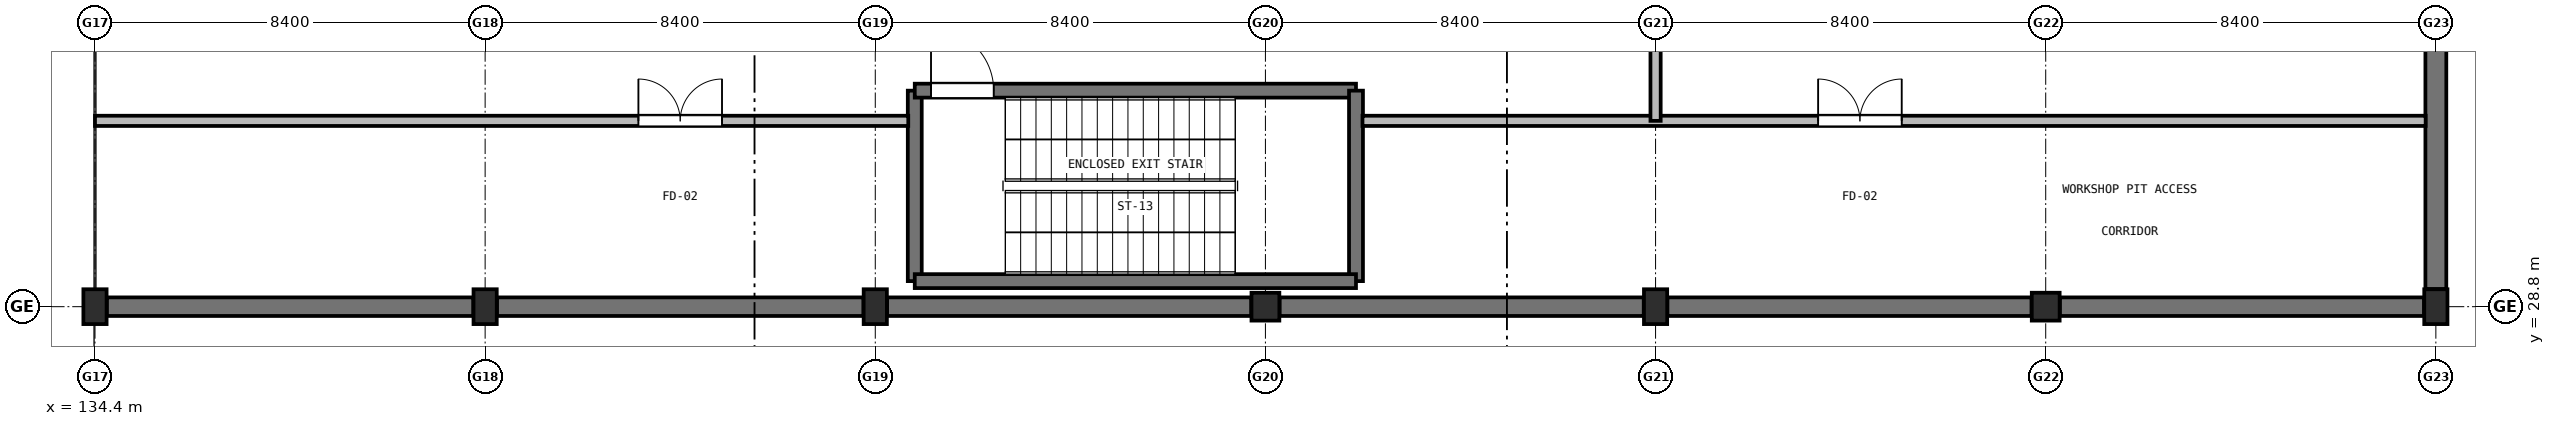
"""IFC4 building model, lengths in metres.
Left out: names, types, materials, properties, quantities, classifications, styles, units other than length and angle.
Written with IfcOpenShell. Run it as: python <this file> out.ifc"""

import sys

from ifc_helpers import new_model, si_unit, direction, frame, frame_2d, origin, origin_2d, place, context, subcontext, project, spatial, rectangle, extrude, element, fill, save


model = new_model("IFC4")
c1 = context("Model", 3, precision=1e-05, world=origin(), true_north=direction((0.0, 1.0)))
c2 = subcontext(c1, "Body", "Model", "MODEL_VIEW")
j1 = project(units=[si_unit("LENGTHUNIT", "METRE"), si_unit("PLANEANGLEUNIT", "RADIAN")], contexts=[c1])
p1 = place(None, origin())
s1 = spatial("IfcSite", under=j1, at=p1, CompositionType="ELEMENT")
p2 = place(p1, origin())
s2 = spatial("IfcBuilding", under=s1, at=p2, CompositionType="ELEMENT")
p3 = place(p2, frame((0.0, 0.0, -4.8)))
s3 = spatial("IfcBuildingStorey", under=s2, at=p3, CompositionType="ELEMENT", Elevation=-4.8)
for number, where, z_axis, x_axis in (
    (1, (134.4, 28.8, 0.0), (0.0, 0.0, 1.0), (1.0, 0.0, 0.0)),
    (2, (142.8, 28.8, 0.0), (0.0, 0.0, 1.0), (1.0, 0.0, 0.0)),
    (3, (151.2, 28.8, 0.0), (0.0, 0.0, 1.0), (1.0, 0.0, 0.0)),
):
    element("IfcColumn", number, at=place(p3, frame(where, z_axis=z_axis, x_axis=x_axis)), inside=s3, PredefinedType="COLUMN", context=c2, shape_type="SweptSolid", body=[
        extrude(rectangle(XDim=0.5, YDim=0.75, at=origin_2d()), origin(), (0.0, 0.0, 1.0), 4.8),
    ])
p4 = place(p3, frame((159.6, 28.8, 0.0), z_axis=(0.0, 0.0, 1.0), x_axis=(1.0, 0.0, 0.0)))
e4 = element("IfcColumn", 4, at=p4, inside=s3, PredefinedType="COLUMN", context=c2, shape_type="SweptSolid", body=[
    extrude(rectangle(XDim=0.6, YDim=0.6, at=origin_2d()), origin(), (0.0, 0.0, 1.0), 4.8),
])
p5 = place(p3, frame((168.0, 28.8, 0.0), z_axis=(0.0, 0.0, 1.0), x_axis=(1.0, 0.0, 0.0)))
e5 = element("IfcColumn", 5, at=p5, inside=s3, PredefinedType="COLUMN", context=c2, shape_type="SweptSolid", body=[
    extrude(rectangle(XDim=0.5, YDim=0.75, at=origin_2d()), origin(), (0.0, 0.0, 1.0), 4.8),
])
p6 = place(p3, frame((176.4, 28.8, 0.0), z_axis=(0.0, 0.0, 1.0), x_axis=(1.0, 0.0, 0.0)))
e6 = element("IfcColumn", 6, at=p6, inside=s3, PredefinedType="COLUMN", context=c2, shape_type="SweptSolid", body=[
    extrude(rectangle(XDim=0.6, YDim=0.6, at=origin_2d()), origin(), (0.0, 0.0, 1.0), 4.8),
])
p7 = place(p3, frame((184.8, 28.8, 0.0), z_axis=(0.0, 0.0, 1.0), x_axis=(1.0, 0.0, 0.0)))
e7 = element("IfcColumn", 7, at=p7, inside=s3, PredefinedType="COLUMN", context=c2, shape_type="SweptSolid", body=[
    extrude(rectangle(XDim=0.5, YDim=0.75, at=origin_2d()), origin(), (0.0, 0.0, 1.0), 4.8),
])
p8 = place(p3, frame((184.8, 29.18, 0.0), z_axis=(0.0, 0.0, 1.0), x_axis=(0.0, 1.0, 0.0)))
e8 = element("IfcWall", 8, at=p8, inside=s3, PredefinedType="SHEAR", context=c2, shape_type="SweptSolid", body=[
    extrude(rectangle(XDim=6.265, YDim=0.45, at=frame_2d((3.133, 0.0))), origin(), (0.0, 0.0, 1.0), 3.64),
])
p9 = place(p3, frame((134.655, 28.8, 0.0), z_axis=(0.0, 0.0, 1.0), x_axis=(1.0, 0.0, 0.0)))
e9 = element("IfcWall", 9, at=p9, inside=s3, PredefinedType="SHEAR", context=c2, shape_type="SweptSolid", body=[
    extrude(rectangle(XDim=7.89, YDim=0.4, at=frame_2d((3.945, 0.0))), origin(), (0.0, 0.0, 1.0), 3.64),
])
p10 = place(p3, frame((143.055, 28.8, 0.0), z_axis=(0.0, 0.0, 1.0), x_axis=(1.0, 0.0, 0.0)))
e10 = element("IfcWall", 10, at=p10, inside=s3, PredefinedType="SHEAR", context=c2, shape_type="SweptSolid", body=[
    extrude(rectangle(XDim=7.89, YDim=0.4, at=frame_2d((3.945, 0.0))), origin(), (0.0, 0.0, 1.0), 3.64),
])
p11 = place(p3, frame((151.455, 28.8, 0.0), z_axis=(0.0, 0.0, 1.0), x_axis=(1.0, 0.0, 0.0)))
e11 = element("IfcWall", 11, at=p11, inside=s3, PredefinedType="SHEAR", context=c2, shape_type="SweptSolid", body=[
    extrude(rectangle(XDim=7.84, YDim=0.4, at=frame_2d((3.92, 0.0))), origin(), (0.0, 0.0, 1.0), 3.64),
])
for number, where, z_axis, x_axis in (
    (12, (159.905, 28.8, 0.0), (0.0, 0.0, 1.0), (1.0, 0.0, 0.0)),
    (13, (168.255, 28.8, 0.0), (0.0, 0.0, 1.0), (1.0, 0.0, 0.0)),
):
    element("IfcWall", number, at=place(p3, frame(where, z_axis=z_axis, x_axis=x_axis)), inside=s3, PredefinedType="SHEAR", context=c2, shape_type="SweptSolid", body=[
        extrude(rectangle(XDim=7.84, YDim=0.4, at=frame_2d((3.92, 0.0))), origin(), (0.0, 0.0, 1.0), 3.64),
    ])
p12 = place(p3, frame((176.705, 28.8, 0.0), z_axis=(0.0, 0.0, 1.0), x_axis=(1.0, 0.0, 0.0)))
e14 = element("IfcWall", 14, at=p12, inside=s3, PredefinedType="SHEAR", context=c2, shape_type="SweptSolid", body=[
    extrude(rectangle(XDim=7.84, YDim=0.4, at=frame_2d((3.92, 0.0))), origin(), (0.0, 0.0, 1.0), 3.64),
])
p13 = place(p3, frame((152.05, 29.35, 0.0), z_axis=(0.0, 0.0, 1.0), x_axis=(0.0, 1.0, 0.0)))
e15 = element("IfcWall", 15, at=p13, inside=s3, PredefinedType="SHEAR", context=c2, shape_type="SweptSolid", body=[
    extrude(rectangle(XDim=4.1, YDim=0.3, at=frame_2d((2.05, 0.0))), origin(), (0.0, 0.0, 1.0), 4.46),
])
p14 = place(p3, frame((152.05, 33.45, 0.0), z_axis=(0.0, 0.0, 1.0), x_axis=(1.0, 0.0, 0.0)))
e16 = element("IfcWall", 16, at=p14, inside=s3, PredefinedType="SHEAR", context=c2, shape_type="SweptSolid", body=[
    extrude(rectangle(XDim=9.5, YDim=0.3, at=frame_2d((4.75, 0.0))), origin(), (0.0, 0.0, 1.0), 4.46),
])
p15 = place(p14, frame((0.35, 0.0, 0.0)))
e17 = element("IfcOpeningElement", 17, at=p15, cuts=e16, PredefinedType="OPENING", context=c2, shape_type="SweptSolid", body=[
    extrude(rectangle(XDim=1.35, YDim=2.2, at=frame_2d((0.675, 1.1))), frame((0.0, 0.16, 0.0), z_axis=(0.0, -1.0, 0.0), x_axis=(1.0, 0.0, 0.0)), (0.0, 0.0, 1.0), 0.32),
])
p16 = place(p3, frame((161.55, 33.45, 0.0), z_axis=(0.0, 0.0, 1.0), x_axis=(0.0, -1.0, 0.0)))
e18 = element("IfcWall", 18, at=p16, inside=s3, PredefinedType="SHEAR", context=c2, shape_type="SweptSolid", body=[
    extrude(rectangle(XDim=4.1, YDim=0.3, at=frame_2d((2.05, 0.0))), origin(), (0.0, 0.0, 1.0), 4.46),
])
p17 = place(p3, frame((161.55, 29.35, 0.0), z_axis=(0.0, 0.0, 1.0), x_axis=(-1.0, 0.0, 0.0)))
e19 = element("IfcWall", 19, at=p17, inside=s3, PredefinedType="SHEAR", context=c2, shape_type="SweptSolid", body=[
    extrude(rectangle(XDim=9.5, YDim=0.3, at=frame_2d((4.75, 0.0))), origin(), (0.0, 0.0, 1.0), 4.46),
])
p18 = place(p3, frame((134.4, 32.8, 0.0), z_axis=(0.0, 0.0, 1.0), x_axis=(1.0, 0.0, 0.0)))
e20 = element("IfcWall", 20, at=p18, inside=s3, PredefinedType="SOLIDWALL", context=c2, shape_type="SweptSolid", body=[
    extrude(rectangle(XDim=17.51, YDim=0.22, at=frame_2d((8.755, 0.0))), origin(), (0.0, 0.0, 1.0), 3.785),
])
p19 = place(p18, frame((11.7, 0.0, 0.0)))
e21 = element("IfcOpeningElement", 21, at=p19, cuts=e20, PredefinedType="OPENING", context=c2, shape_type="SweptSolid", body=[
    extrude(rectangle(XDim=1.8, YDim=2.2, at=frame_2d((0.9, 1.1))), frame((0.0, 0.12, 0.0), z_axis=(0.0, -1.0, 0.0), x_axis=(1.0, 0.0, 0.0)), (0.0, 0.0, 1.0), 0.24),
])
p20 = place(p3, frame((161.69, 32.8, 0.0), z_axis=(0.0, 0.0, 1.0), x_axis=(1.0, 0.0, 0.0)))
e22 = element("IfcWall", 22, at=p20, inside=s3, PredefinedType="SOLIDWALL", context=c2, shape_type="SweptSolid", body=[
    extrude(rectangle(XDim=22.89, YDim=0.22, at=frame_2d((11.445, 0.0))), origin(), (0.0, 0.0, 1.0), 3.785),
])
p21 = place(p20, frame((9.81, 0.0, 0.0)))
e23 = element("IfcOpeningElement", 23, at=p21, cuts=e22, PredefinedType="OPENING", context=c2, shape_type="SweptSolid", body=[
    extrude(rectangle(XDim=1.8, YDim=2.2, at=frame_2d((0.9, 1.1))), frame((0.0, 0.12, 0.0), z_axis=(0.0, -1.0, 0.0), x_axis=(1.0, 0.0, 0.0)), (0.0, 0.0, 1.0), 0.24),
])
p22 = place(p3, frame((168.0, 32.8, 0.0), z_axis=(0.0, 0.0, 1.0), x_axis=(0.0, 1.0, 0.0)))
e24 = element("IfcWall", 24, at=p22, inside=s3, PredefinedType="SOLIDWALL", context=c2, shape_type="SweptSolid", body=[
    extrude(rectangle(XDim=2.63, YDim=0.22, at=frame_2d((1.315, 0.0))), origin(), (0.0, 0.0, 1.0), 3.785),
])
p23 = place(p15, origin())
e25 = element("IfcDoor", 25, at=p23, inside=s3, OperationType="SINGLE_SWING_LEFT", PredefinedType="DOOR", context=c2, shape_type="SweptSolid", body=[
    extrude(rectangle(XDim=1.35, YDim=2.2, at=frame_2d((0.675, 1.1))), frame((0.0, 0.025, 0.0), z_axis=(0.0, -1.0, 0.0), x_axis=(1.0, 0.0, 0.0)), (0.0, 0.0, 1.0), 0.05),
])
fill(e17, e25)
p24 = place(p19, origin())
e26 = element("IfcDoor", 26, at=p24, inside=s3, OperationType="DOUBLE_DOOR_SINGLE_SWING", PredefinedType="DOOR", context=c2, shape_type="SweptSolid", body=[
    extrude(rectangle(XDim=1.8, YDim=2.2, at=frame_2d((0.9, 1.1))), frame((0.0, 0.025, 0.0), z_axis=(0.0, -1.0, 0.0), x_axis=(1.0, 0.0, 0.0)), (0.0, 0.0, 1.0), 0.05),
])
fill(e21, e26)
p25 = place(p21, origin())
e27 = element("IfcDoor", 27, at=p25, inside=s3, OperationType="DOUBLE_DOOR_SINGLE_SWING", PredefinedType="DOOR", context=c2, shape_type="SweptSolid", body=[
    extrude(rectangle(XDim=1.8, YDim=2.2, at=frame_2d((0.9, 1.1))), frame((0.0, 0.025, 0.0), z_axis=(0.0, -1.0, 0.0), x_axis=(1.0, 0.0, 0.0)), (0.0, 0.0, 1.0), 0.05),
])
fill(e23, e27)
save(model, sys.argv[1])
